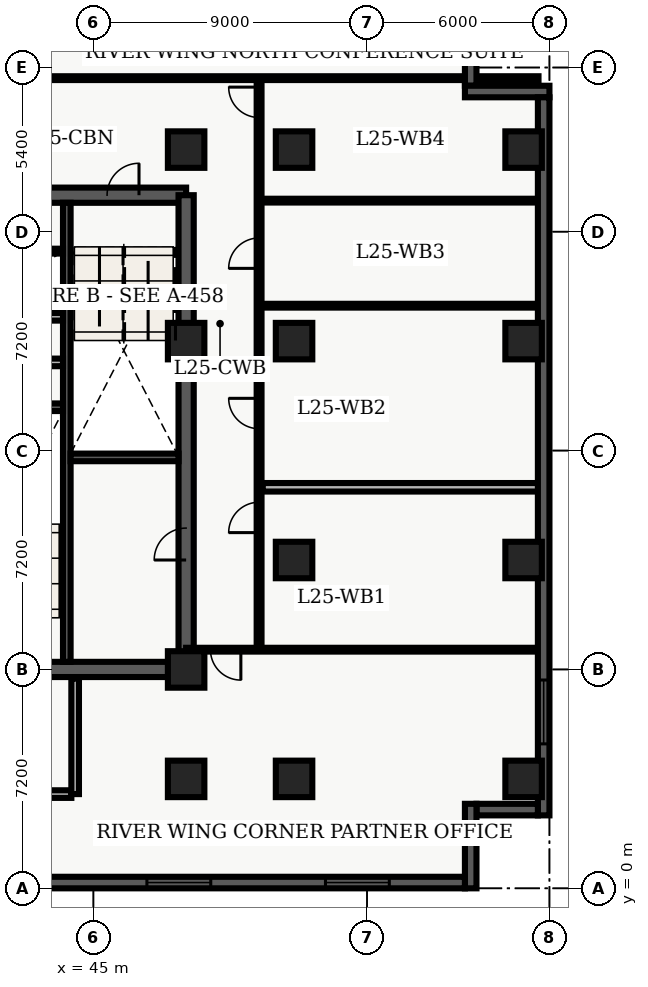
"""IFC4 building model, lengths in metres.
Left out: names, types, materials, properties, quantities, classifications, styles, units other than length and angle.
Written with IfcOpenShell. Run it as: python <this file> out.ifc"""

import sys

from ifc_helpers import new_model, entity, si_unit, converted_unit, direction, frame, origin_with_axes, origin_2d_with_axis, place, context, subcontext, project, spatial, polyline, rectangle, outline, extrude, element, fill, save


model = new_model("IFC4")
c1 = context("Model", 3, precision=1e-05, world=origin_with_axes(), true_north=direction((0.0, 1.0)))
c2 = subcontext(c1, "Body", "Model", "MODEL_VIEW")
j1 = project(units=[si_unit("LENGTHUNIT", "METRE"), converted_unit("PLANEANGLEUNIT", "DEGREE", entity("IfcPlaneAngleMeasure", 0.017), si_unit("PLANEANGLEUNIT", "RADIAN"), dimensions=[0, 0, 0, 0, 0, 0, 0])], contexts=[c1])
p1 = place(None, origin_with_axes())
s1 = spatial("IfcSite", under=j1, at=p1, CompositionType="ELEMENT")
p2 = place(p1, origin_with_axes())
s2 = spatial("IfcBuilding", under=s1, at=p2, CompositionType="ELEMENT")
p3 = place(p2, frame((0.0, 0.0, 104.7), z_axis=(0.0, 0.0, 1.0), x_axis=(1.0, 0.0, 0.0)))
s3 = spatial("IfcBuildingStorey", under=s2, at=p3, CompositionType="ELEMENT", Elevation=104.7)
p4 = place(p3, frame((40.2, 7.2, 0.0), z_axis=(0.0, 0.0, 1.0), x_axis=(1.0, 0.0, 0.0)))
e1 = element("IfcWall", 1, at=p4, inside=s3, PredefinedType="SHEAR", context=c2, shape_type="SweptSolid", body=[
    extrude(outline(polyline([(0.0, -0.25), (7.85, -0.25), (7.85, 0.25), (0.0, 0.25), (0.0, -0.25)])), origin_with_axes(), (0.0, 0.0, 1.0), 3.66),
])
p5 = place(p4, frame((2.175, 0.0, 0.0), z_axis=(0.0, 0.0, 1.0), x_axis=(1.0, 0.0, 0.0)))
e2 = element("IfcOpeningElement", 2, at=p5, cuts=e1, PredefinedType="OPENING", context=c2, shape_type="SweptSolid", body=[
    extrude(rectangle(XDim=1.05, YDim=0.52, at=origin_2d_with_axis()), origin_with_axes(), (0.0, 0.0, 1.0), 2.15),
])
p6 = place(p3, frame((40.2, 22.8, 0.0), z_axis=(0.0, 0.0, 1.0), x_axis=(1.0, 0.0, 0.0)))
e3 = element("IfcWall", 3, at=p6, inside=s3, PredefinedType="SHEAR", context=c2, shape_type="SweptSolid", body=[
    extrude(outline(polyline([(0.0, -0.25), (7.85, -0.25), (7.85, 0.25), (0.0, 0.25), (0.0, -0.25)])), origin_with_axes(), (0.0, 0.0, 1.0), 3.66),
])
p7 = place(p6, frame((5.775, 0.0, 0.0), z_axis=(0.0, 0.0, 1.0), x_axis=(1.0, 0.0, 0.0)))
e4 = element("IfcOpeningElement", 4, at=p7, cuts=e3, PredefinedType="OPENING", context=c2, shape_type="SweptSolid", body=[
    extrude(rectangle(XDim=1.05, YDim=0.52, at=origin_2d_with_axis()), origin_with_axes(), (0.0, 0.0, 1.0), 2.15),
])
p8 = place(p6, frame((2.15, 0.0, 0.0), z_axis=(0.0, 0.0, 1.0), x_axis=(1.0, 0.0, 0.0)))
e5 = element("IfcOpeningElement", 5, at=p8, cuts=e3, PredefinedType="OPENING", context=c2, shape_type="SweptSolid", body=[
    extrude(rectangle(XDim=0.9, YDim=0.52, at=origin_2d_with_axis()), origin_with_axes(), (0.0, 0.0, 1.0), 2.15),
])
p9 = place(p3, frame((48.05, 7.2, 0.0), z_axis=(0.0, 0.0, 1.0), x_axis=(0.0, 1.0, 0.0)))
e6 = element("IfcWall", 6, at=p9, inside=s3, PredefinedType="SHEAR", context=c2, shape_type="SweptSolid", body=[
    extrude(outline(polyline([(0.0, -0.25), (15.6, -0.25), (15.6, 0.25), (0.0, 0.25), (0.0, -0.25)])), origin_with_axes(), (0.0, 0.0, 1.0), 3.66),
])
p10 = place(p9, frame((4.125, 0.0, 0.0), z_axis=(0.0, 0.0, 1.0), x_axis=(1.0, 0.0, 0.0)))
e7 = element("IfcOpeningElement", 7, at=p10, cuts=e6, PredefinedType="OPENING", context=c2, shape_type="SweptSolid", body=[
    extrude(rectangle(XDim=1.05, YDim=0.52, at=origin_2d_with_axis()), origin_with_axes(), (0.0, 0.0, 1.0), 2.15),
])
p11 = place(p3, frame((44.125, 7.45, 0.0), z_axis=(0.0, 0.0, 1.0), x_axis=(0.0, 1.0, 0.0)))
e8 = element("IfcWall", 8, at=p11, inside=s3, PredefinedType="SHEAR", context=c2, shape_type="SweptSolid", body=[
    extrude(outline(polyline([(0.0, -0.125), (15.1, -0.125), (15.1, 0.125), (0.0, 0.125), (0.0, -0.125)])), origin_with_axes(), (0.0, 0.0, 1.0), 3.66),
])
for number, where, z_axis, x_axis in (
    (9, (40.45, 15.825, 0.0), (0.0, 0.0, 1.0), (1.0, 0.0, 0.0)),
    (10, (44.25, 14.175, 0.0), (0.0, 0.0, 1.0), (1.0, 0.0, 0.0)),
):
    element("IfcWall", number, at=place(p3, frame(where, z_axis=z_axis, x_axis=x_axis)), inside=s3, PredefinedType="SHEAR", context=c2, shape_type="SweptSolid", body=[
        extrude(outline(polyline([(0.0, -0.125), (3.55, -0.125), (3.55, 0.125), (0.0, 0.125), (0.0, -0.125)])), origin_with_axes(), (0.0, 0.0, 1.0), 3.66),
    ])
p12 = place(p3, frame((40.5, 17.3, 0.0), z_axis=(0.0, 0.0, 1.0), x_axis=(1.0, 0.0, 0.0)))
e11 = element("IfcWall", 11, at=p12, inside=s3, PredefinedType="SOLIDWALL", context=c2, shape_type="SweptSolid", body=[
    extrude(outline(polyline([(0.0, -0.125), (3.5, -0.125), (3.5, 0.125), (0.0, 0.125), (0.0, -0.125)])), origin_with_axes(), (0.0, 0.0, 1.0), 2.7),
])
p13 = place(p12, frame((2.4, 0.0, 0.0), z_axis=(0.0, 0.0, 1.0), x_axis=(1.0, 0.0, 0.0)))
e12 = element("IfcOpeningElement", 12, at=p13, cuts=e11, PredefinedType="OPENING", context=c2, shape_type="SweptSolid", body=[
    extrude(rectangle(XDim=0.9, YDim=0.27, at=origin_2d_with_axis()), origin_with_axes(), (0.0, 0.0, 1.0), 2.15),
])
p14 = place(p3, frame((40.5, 18.8, 0.0), z_axis=(0.0, 0.0, 1.0), x_axis=(1.0, 0.0, 0.0)))
e13 = element("IfcWall", 13, at=p14, inside=s3, PredefinedType="SOLIDWALL", context=c2, shape_type="SweptSolid", body=[
    extrude(outline(polyline([(0.0, -0.125), (3.5, -0.125), (3.5, 0.125), (0.0, 0.125), (0.0, -0.125)])), origin_with_axes(), (0.0, 0.0, 1.0), 2.7),
])
p15 = place(p3, frame((40.325, 3.1, 0.0), z_axis=(0.0, 0.0, 1.0), x_axis=(1.0, 0.0, 0.0)))
e14 = element("IfcWall", 14, at=p15, inside=s3, PredefinedType="SOLIDWALL", context=c2, shape_type="SweptSolid", body=[
    extrude(outline(polyline([(0.0, -0.125), (3.95, -0.125), (3.95, 0.125), (0.0, 0.125), (0.0, -0.125)])), origin_with_axes(), (0.0, 0.0, 1.0), 2.7),
])
p16 = place(p3, frame((44.4, 3.1, 0.0), z_axis=(0.0, 0.0, 1.0), x_axis=(0.0, 1.0, 0.0)))
e15 = element("IfcWall", 15, at=p16, inside=s3, PredefinedType="SOLIDWALL", context=c2, shape_type="SweptSolid", body=[
    extrude(outline(polyline([(0.0, -0.125), (3.8, -0.125), (3.8, 0.125), (0.0, 0.125), (0.0, -0.125)])), origin_with_axes(), (0.0, 0.0, 1.0), 2.7),
])
for number, where, z_axis, x_axis in (
    (16, (48.05, 3.6, 0.0), (0.0, 0.0, 1.0), (1.0, 0.0, 0.0)),
    (17, (48.05, 7.2, 0.0), (0.0, 0.0, 1.0), (1.0, 0.0, 0.0)),
    (18, (48.05, 18.0, 0.0), (0.0, 0.0, 1.0), (1.0, 0.0, 0.0)),
    (19, (48.05, 24.3, 0.0), (0.0, 0.0, 1.0), (1.0, 0.0, 0.0)),
    (20, (51.6, 3.6, 0.0), (0.0, 0.0, 1.0), (1.0, 0.0, 0.0)),
    (21, (51.6, 10.8, 0.0), (0.0, 0.0, 1.0), (1.0, 0.0, 0.0)),
    (22, (51.6, 18.0, 0.0), (0.0, 0.0, 1.0), (1.0, 0.0, 0.0)),
    (23, (51.6, 24.3, 0.0), (0.0, 0.0, 1.0), (1.0, 0.0, 0.0)),
    (24, (59.15, 3.6, 0.0), (0.0, 0.0, 1.0), (1.0, 0.0, 0.0)),
    (25, (59.15, 10.8, 0.0), (0.0, 0.0, 1.0), (1.0, 0.0, 0.0)),
    (26, (59.15, 18.0, 0.0), (0.0, 0.0, 1.0), (1.0, 0.0, 0.0)),
    (27, (59.15, 24.3, 0.0), (0.0, 0.0, 1.0), (1.0, 0.0, 0.0)),
):
    element("IfcColumn", number, at=place(p3, frame(where, z_axis=z_axis, x_axis=x_axis)), inside=s3, PredefinedType="COLUMN", context=c2, shape_type="SweptSolid", body=[
        extrude(rectangle(XDim=1.2, YDim=1.2, at=origin_2d_with_axis()), origin_with_axes(), (0.0, 0.0, 1.0), 3.9),
    ])
p17 = place(p3, frame((40.5, 20.96, 0.0), z_axis=(0.0, 0.0, 1.0), x_axis=(1.0, 0.0, 0.0)))
e28 = element("IfcWall", 28, at=p17, inside=s3, PredefinedType="PARTITIONING", context=c2, shape_type="SweptSolid", body=[
    extrude(outline(polyline([(0.0, -0.08), (3.5, -0.08), (3.5, 0.08), (0.0, 0.08), (0.0, -0.08)])), origin_with_axes(), (0.0, 0.0, 1.0), 2.7),
])
p18 = place(p3, frame((50.45, 7.85, 0.0), z_axis=(0.0, 0.0, 1.0), x_axis=(0.0, 1.0, 0.0)))
e29 = element("IfcWall", 29, at=p18, inside=s3, PredefinedType="PARTITIONING", context=c2, shape_type="SweptSolid", body=[
    extrude(outline(polyline([(0.0, -0.08), (18.8, -0.08), (18.8, 0.08), (0.0, 0.08), (0.0, -0.08)])), origin_with_axes(), (0.0, 0.0, 1.0), 2.7),
])
p19 = place(p18, frame((4.351, 0.0, 0.0), z_axis=(0.0, 0.0, 1.0), x_axis=(1.0, 0.0, 0.0)))
e30 = element("IfcOpeningElement", 30, at=p19, cuts=e29, PredefinedType="OPENING", context=c2, shape_type="SweptSolid", body=[
    extrude(rectangle(XDim=1.0, YDim=0.18, at=origin_2d_with_axis()), origin_with_axes(), (0.0, 0.0, 1.0), 2.15),
])
p20 = place(p18, frame((7.768, 0.0, 0.0), z_axis=(0.0, 0.0, 1.0), x_axis=(1.0, 0.0, 0.0)))
e31 = element("IfcOpeningElement", 31, at=p20, cuts=e29, PredefinedType="OPENING", context=c2, shape_type="SweptSolid", body=[
    extrude(rectangle(XDim=1.0, YDim=0.18, at=origin_2d_with_axis()), origin_with_axes(), (0.0, 0.0, 1.0), 2.15),
])
p21 = place(p18, frame((13.043, 0.0, 0.0), z_axis=(0.0, 0.0, 1.0), x_axis=(1.0, 0.0, 0.0)))
e32 = element("IfcOpeningElement", 32, at=p21, cuts=e29, PredefinedType="OPENING", context=c2, shape_type="SweptSolid", body=[
    extrude(rectangle(XDim=1.0, YDim=0.18, at=origin_2d_with_axis()), origin_with_axes(), (0.0, 0.0, 1.0), 2.15),
])
p22 = place(p18, frame((18.005, 0.0, 0.0), z_axis=(0.0, 0.0, 1.0), x_axis=(1.0, 0.0, 0.0)))
e33 = element("IfcOpeningElement", 33, at=p22, cuts=e29, PredefinedType="OPENING", context=c2, shape_type="SweptSolid", body=[
    extrude(rectangle(XDim=1.0, YDim=0.18, at=origin_2d_with_axis()), origin_with_axes(), (0.0, 0.0, 1.0), 2.15),
])
p23 = place(p3, frame((59.64, 7.85, 0.0), z_axis=(0.0, 0.0, 1.0), x_axis=(-1.0, 0.0, 0.0)))
e34 = element("IfcWall", 34, at=p23, inside=s3, PredefinedType="PARTITIONING", context=c2, shape_type="SweptSolid", body=[
    extrude(outline(polyline([(0.0, -0.062), (11.59, -0.062), (11.59, 0.062), (0.0, 0.062), (0.0, -0.062)])), origin_with_axes(), (0.0, 0.0, 1.0), 2.7),
])
p24 = place(p23, frame((10.29, 0.0, 0.0), z_axis=(0.0, 0.0, 1.0), x_axis=(1.0, 0.0, 0.0)))
e35 = element("IfcOpeningElement", 35, at=p24, cuts=e34, PredefinedType="OPENING", context=c2, shape_type="SweptSolid", body=[
    extrude(rectangle(XDim=1.0, YDim=0.145, at=origin_2d_with_axis()), origin_with_axes(), (0.0, 0.0, 1.0), 2.15),
])
p25 = place(p3, frame((38.76, 26.65, 0.0), z_axis=(0.0, 0.0, 1.0), x_axis=(1.0, 0.0, 0.0)))
e36 = element("IfcWall", 36, at=p25, inside=s3, PredefinedType="PARTITIONING", context=c2, shape_type="SweptSolid", body=[
    extrude(outline(polyline([(0.0, -0.062), (20.88, -0.062), (20.88, 0.062), (0.0, 0.062), (0.0, -0.062)])), origin_with_axes(), (0.0, 0.0, 1.0), 2.7),
])
p26 = place(p25, frame((4.24, 0.0, 0.0), z_axis=(0.0, 0.0, 1.0), x_axis=(1.0, 0.0, 0.0)))
e37 = element("IfcOpeningElement", 37, at=p26, cuts=e36, PredefinedType="OPENING", context=c2, shape_type="SweptSolid", body=[
    extrude(rectangle(XDim=1.0, YDim=0.145, at=origin_2d_with_axis()), origin_with_axes(), (0.0, 0.0, 1.0), 2.15),
])
p27 = place(p3, frame((50.57, 13.192, 0.0), z_axis=(0.0, 0.0, 1.0), x_axis=(1.0, 0.0, 0.0)))
e38 = element("IfcWall", 38, at=p27, inside=s3, PredefinedType="PARTITIONING", context=c2, shape_type="SweptSolid", body=[
    extrude(outline(polyline([(0.0, -0.14), (9.055, -0.14), (9.055, 0.14), (0.0, 0.14), (0.0, -0.14)])), origin_with_axes(), (0.0, 0.0, 1.0), 2.7),
])
for number, where, z_axis, x_axis in (
    (39, (50.57, 19.165, 0.0), (0.0, 0.0, 1.0), (1.0, 0.0, 0.0)),
    (40, (50.57, 22.621, 0.0), (0.0, 0.0, 1.0), (1.0, 0.0, 0.0)),
):
    element("IfcWall", number, at=place(p3, frame(where, z_axis=z_axis, x_axis=x_axis)), inside=s3, PredefinedType="PARTITIONING", context=c2, shape_type="SweptSolid", body=[
        extrude(outline(polyline([(0.0, -0.062), (9.055, -0.062), (9.055, 0.062), (0.0, 0.062), (0.0, -0.062)])), origin_with_axes(), (0.0, 0.0, 1.0), 2.7),
    ])
p28 = place(p3, frame((57.41, 28.42, 0.0), z_axis=(0.0, 0.0, 1.0), x_axis=(0.0, -1.0, 0.0)))
e41 = element("IfcWall", 41, at=p28, inside=s3, PredefinedType="SOLIDWALL", context=c2, shape_type="SweptSolid", body=[
    extrude(outline(polyline([(0.0, -0.19), (2.02, -0.19), (2.02, 0.19), (0.0, 0.19), (0.0, -0.19)])), origin_with_axes(), (0.0, 0.0, 1.0), 3.66),
])
p29 = place(p3, frame((57.22, 26.21, 0.0), z_axis=(0.0, 0.0, 1.0), x_axis=(1.0, 0.0, 0.0)))
e42 = element("IfcWall", 42, at=p29, inside=s3, PredefinedType="SOLIDWALL", context=c2, shape_type="SweptSolid", body=[
    extrude(outline(polyline([(0.0, -0.19), (2.78, -0.19), (2.78, 0.19), (0.0, 0.19), (0.0, -0.19)])), origin_with_axes(), (0.0, 0.0, 1.0), 3.66),
])
p30 = place(p3, frame((59.81, 26.02, 0.0), z_axis=(0.0, 0.0, 1.0), x_axis=(0.0, -1.0, 0.0)))
e43 = element("IfcWall", 43, at=p30, inside=s3, PredefinedType="SOLIDWALL", context=c2, shape_type="SweptSolid", body=[
    extrude(outline(polyline([(0.0, -0.19), (23.62, -0.19), (23.62, 0.19), (0.0, 0.19), (0.0, -0.19)])), origin_with_axes(), (0.0, 0.0, 1.0), 3.66),
])
p31 = place(p30, frame((20.218, 0.0, 0.45), z_axis=(0.0, 0.0, 1.0), x_axis=(1.0, 0.0, 0.0)))
e44 = element("IfcOpeningElement", 44, at=p31, cuts=e43, PredefinedType="OPENING", context=c2, shape_type="SweptSolid", body=[
    extrude(rectangle(XDim=2.1, YDim=0.4, at=origin_2d_with_axis()), origin_with_axes(), (0.0, 0.0, 1.0), 2.2),
])
p32 = place(p3, frame((59.62, 2.59, 0.0), z_axis=(0.0, 0.0, 1.0), x_axis=(-1.0, 0.0, 0.0)))
e45 = element("IfcWall", 45, at=p32, inside=s3, PredefinedType="SOLIDWALL", context=c2, shape_type="SweptSolid", body=[
    extrude(outline(polyline([(0.0, -0.19), (2.02, -0.19), (2.02, 0.19), (0.0, 0.19), (0.0, -0.19)])), origin_with_axes(), (0.0, 0.0, 1.0), 3.66),
])
p33 = place(p3, frame((57.41, 2.78, 0.0), z_axis=(0.0, 0.0, 1.0), x_axis=(0.0, -1.0, 0.0)))
e46 = element("IfcWall", 46, at=p33, inside=s3, PredefinedType="SOLIDWALL", context=c2, shape_type="SweptSolid", body=[
    extrude(outline(polyline([(0.0, -0.19), (2.78, -0.19), (2.78, 0.19), (0.0, 0.19), (0.0, -0.19)])), origin_with_axes(), (0.0, 0.0, 1.0), 3.66),
])
p34 = place(p3, frame((57.22, 0.19, 0.0), z_axis=(0.0, 0.0, 1.0), x_axis=(-1.0, 0.0, 0.0)))
e47 = element("IfcWall", 47, at=p34, inside=s3, PredefinedType="SOLIDWALL", context=c2, shape_type="SweptSolid", body=[
    extrude(outline(polyline([(0.0, -0.19), (18.82, -0.19), (18.82, 0.19), (0.0, 0.19), (0.0, -0.19)])), origin_with_axes(), (0.0, 0.0, 1.0), 3.66),
])
p35 = place(p34, frame((3.537, 0.0, 0.45), z_axis=(0.0, 0.0, 1.0), x_axis=(1.0, 0.0, 0.0)))
e48 = element("IfcOpeningElement", 48, at=p35, cuts=e47, PredefinedType="OPENING", context=c2, shape_type="SweptSolid", body=[
    extrude(rectangle(XDim=2.1, YDim=0.4, at=origin_2d_with_axis()), origin_with_axes(), (0.0, 0.0, 1.0), 2.2),
])
p36 = place(p34, frame((9.41, 0.0, 0.45), z_axis=(0.0, 0.0, 1.0), x_axis=(1.0, 0.0, 0.0)))
e49 = element("IfcOpeningElement", 49, at=p36, cuts=e47, PredefinedType="OPENING", context=c2, shape_type="SweptSolid", body=[
    extrude(rectangle(XDim=2.1, YDim=0.4, at=origin_2d_with_axis()), origin_with_axes(), (0.0, 0.0, 1.0), 2.2),
])
p37 = place(p34, frame((15.283, 0.0, 0.45), z_axis=(0.0, 0.0, 1.0), x_axis=(1.0, 0.0, 0.0)))
e50 = element("IfcOpeningElement", 50, at=p37, cuts=e47, PredefinedType="OPENING", context=c2, shape_type="SweptSolid", body=[
    extrude(rectangle(XDim=2.1, YDim=0.4, at=origin_2d_with_axis()), origin_with_axes(), (0.0, 0.0, 1.0), 2.2),
])
p38 = place(p6, frame((5.775, 0.0, 0.0), z_axis=(0.0, 0.0, 1.0), x_axis=(1.0, 0.0, 0.0)))
e51 = element("IfcDoor", 51, at=p38, inside=s3, OperationType="SINGLE_SWING_RIGHT", PredefinedType="DOOR", context=c2, shape_type="SweptSolid", body=[
    extrude(rectangle(XDim=1.05, YDim=0.09, at=origin_2d_with_axis()), origin_with_axes(), (0.0, 0.0, 1.0), 2.15),
])
fill(e4, e51)
p39 = place(p9, frame((4.125, 0.0, 0.0), z_axis=(0.0, 0.0, 1.0), x_axis=(1.0, 0.0, 0.0)))
e52 = element("IfcDoor", 52, at=p39, inside=s3, OperationType="SINGLE_SWING_LEFT", PredefinedType="DOOR", context=c2, shape_type="SweptSolid", body=[
    extrude(rectangle(XDim=1.05, YDim=0.09, at=origin_2d_with_axis()), origin_with_axes(), (0.0, 0.0, 1.0), 2.15),
])
fill(e7, e52)
p40 = place(p23, frame((10.29, 0.0, 0.0), z_axis=(0.0, 0.0, 1.0), x_axis=(1.0, 0.0, 0.0)))
e53 = element("IfcDoor", 53, at=p40, inside=s3, OperationType="SINGLE_SWING_LEFT", PredefinedType="DOOR", context=c2, shape_type="SweptSolid", body=[
    extrude(rectangle(XDim=1.0, YDim=0.075, at=origin_2d_with_axis()), origin_with_axes(), (0.0, 0.0, 1.0), 2.15),
])
fill(e35, e53)
p41 = place(p18, frame((4.351, 0.0, 0.0), z_axis=(0.0, 0.0, 1.0), x_axis=(1.0, 0.0, 0.0)))
e54 = element("IfcDoor", 54, at=p41, inside=s3, OperationType="SINGLE_SWING_LEFT", PredefinedType="DOOR", context=c2, shape_type="SweptSolid", body=[
    extrude(rectangle(XDim=1.0, YDim=0.09, at=origin_2d_with_axis()), origin_with_axes(), (0.0, 0.0, 1.0), 2.15),
])
fill(e30, e54)
p42 = place(p18, frame((7.768, 0.0, 0.0), z_axis=(0.0, 0.0, 1.0), x_axis=(1.0, 0.0, 0.0)))
e55 = element("IfcDoor", 55, at=p42, inside=s3, OperationType="SINGLE_SWING_RIGHT", PredefinedType="DOOR", context=c2, shape_type="SweptSolid", body=[
    extrude(rectangle(XDim=1.0, YDim=0.09, at=origin_2d_with_axis()), origin_with_axes(), (0.0, 0.0, 1.0), 2.15),
])
fill(e31, e55)
p43 = place(p18, frame((13.043, 0.0, 0.0), z_axis=(0.0, 0.0, 1.0), x_axis=(1.0, 0.0, 0.0)))
e56 = element("IfcDoor", 56, at=p43, inside=s3, OperationType="SINGLE_SWING_LEFT", PredefinedType="DOOR", context=c2, shape_type="SweptSolid", body=[
    extrude(rectangle(XDim=1.0, YDim=0.09, at=origin_2d_with_axis()), origin_with_axes(), (0.0, 0.0, 1.0), 2.15),
])
fill(e32, e56)
p44 = place(p18, frame((18.005, 0.0, 0.0), z_axis=(0.0, 0.0, 1.0), x_axis=(1.0, 0.0, 0.0)))
e57 = element("IfcDoor", 57, at=p44, inside=s3, OperationType="SINGLE_SWING_RIGHT", PredefinedType="DOOR", context=c2, shape_type="SweptSolid", body=[
    extrude(rectangle(XDim=1.0, YDim=0.09, at=origin_2d_with_axis()), origin_with_axes(), (0.0, 0.0, 1.0), 2.15),
])
fill(e33, e57)
p45 = place(p30, frame((20.218, 0.0, 0.45), z_axis=(0.0, 0.0, 1.0), x_axis=(1.0, 0.0, 0.0)))
e58 = element("IfcWindow", 58, at=p45, inside=s3, PredefinedType="WINDOW", context=c2, shape_type="SweptSolid", body=[
    extrude(rectangle(XDim=2.1, YDim=0.09, at=origin_2d_with_axis()), origin_with_axes(), (0.0, 0.0, 1.0), 2.2),
])
fill(e44, e58)
p46 = place(p34, frame((3.537, 0.0, 0.45), z_axis=(0.0, 0.0, 1.0), x_axis=(1.0, 0.0, 0.0)))
e59 = element("IfcWindow", 59, at=p46, inside=s3, PredefinedType="WINDOW", context=c2, shape_type="SweptSolid", body=[
    extrude(rectangle(XDim=2.1, YDim=0.09, at=origin_2d_with_axis()), origin_with_axes(), (0.0, 0.0, 1.0), 2.2),
])
fill(e48, e59)
p47 = place(p34, frame((9.41, 0.0, 0.45), z_axis=(0.0, 0.0, 1.0), x_axis=(1.0, 0.0, 0.0)))
e60 = element("IfcWindow", 60, at=p47, inside=s3, PredefinedType="WINDOW", context=c2, shape_type="SweptSolid", body=[
    extrude(rectangle(XDim=2.1, YDim=0.09, at=origin_2d_with_axis()), origin_with_axes(), (0.0, 0.0, 1.0), 2.2),
])
fill(e49, e60)
save(model, sys.argv[1])
